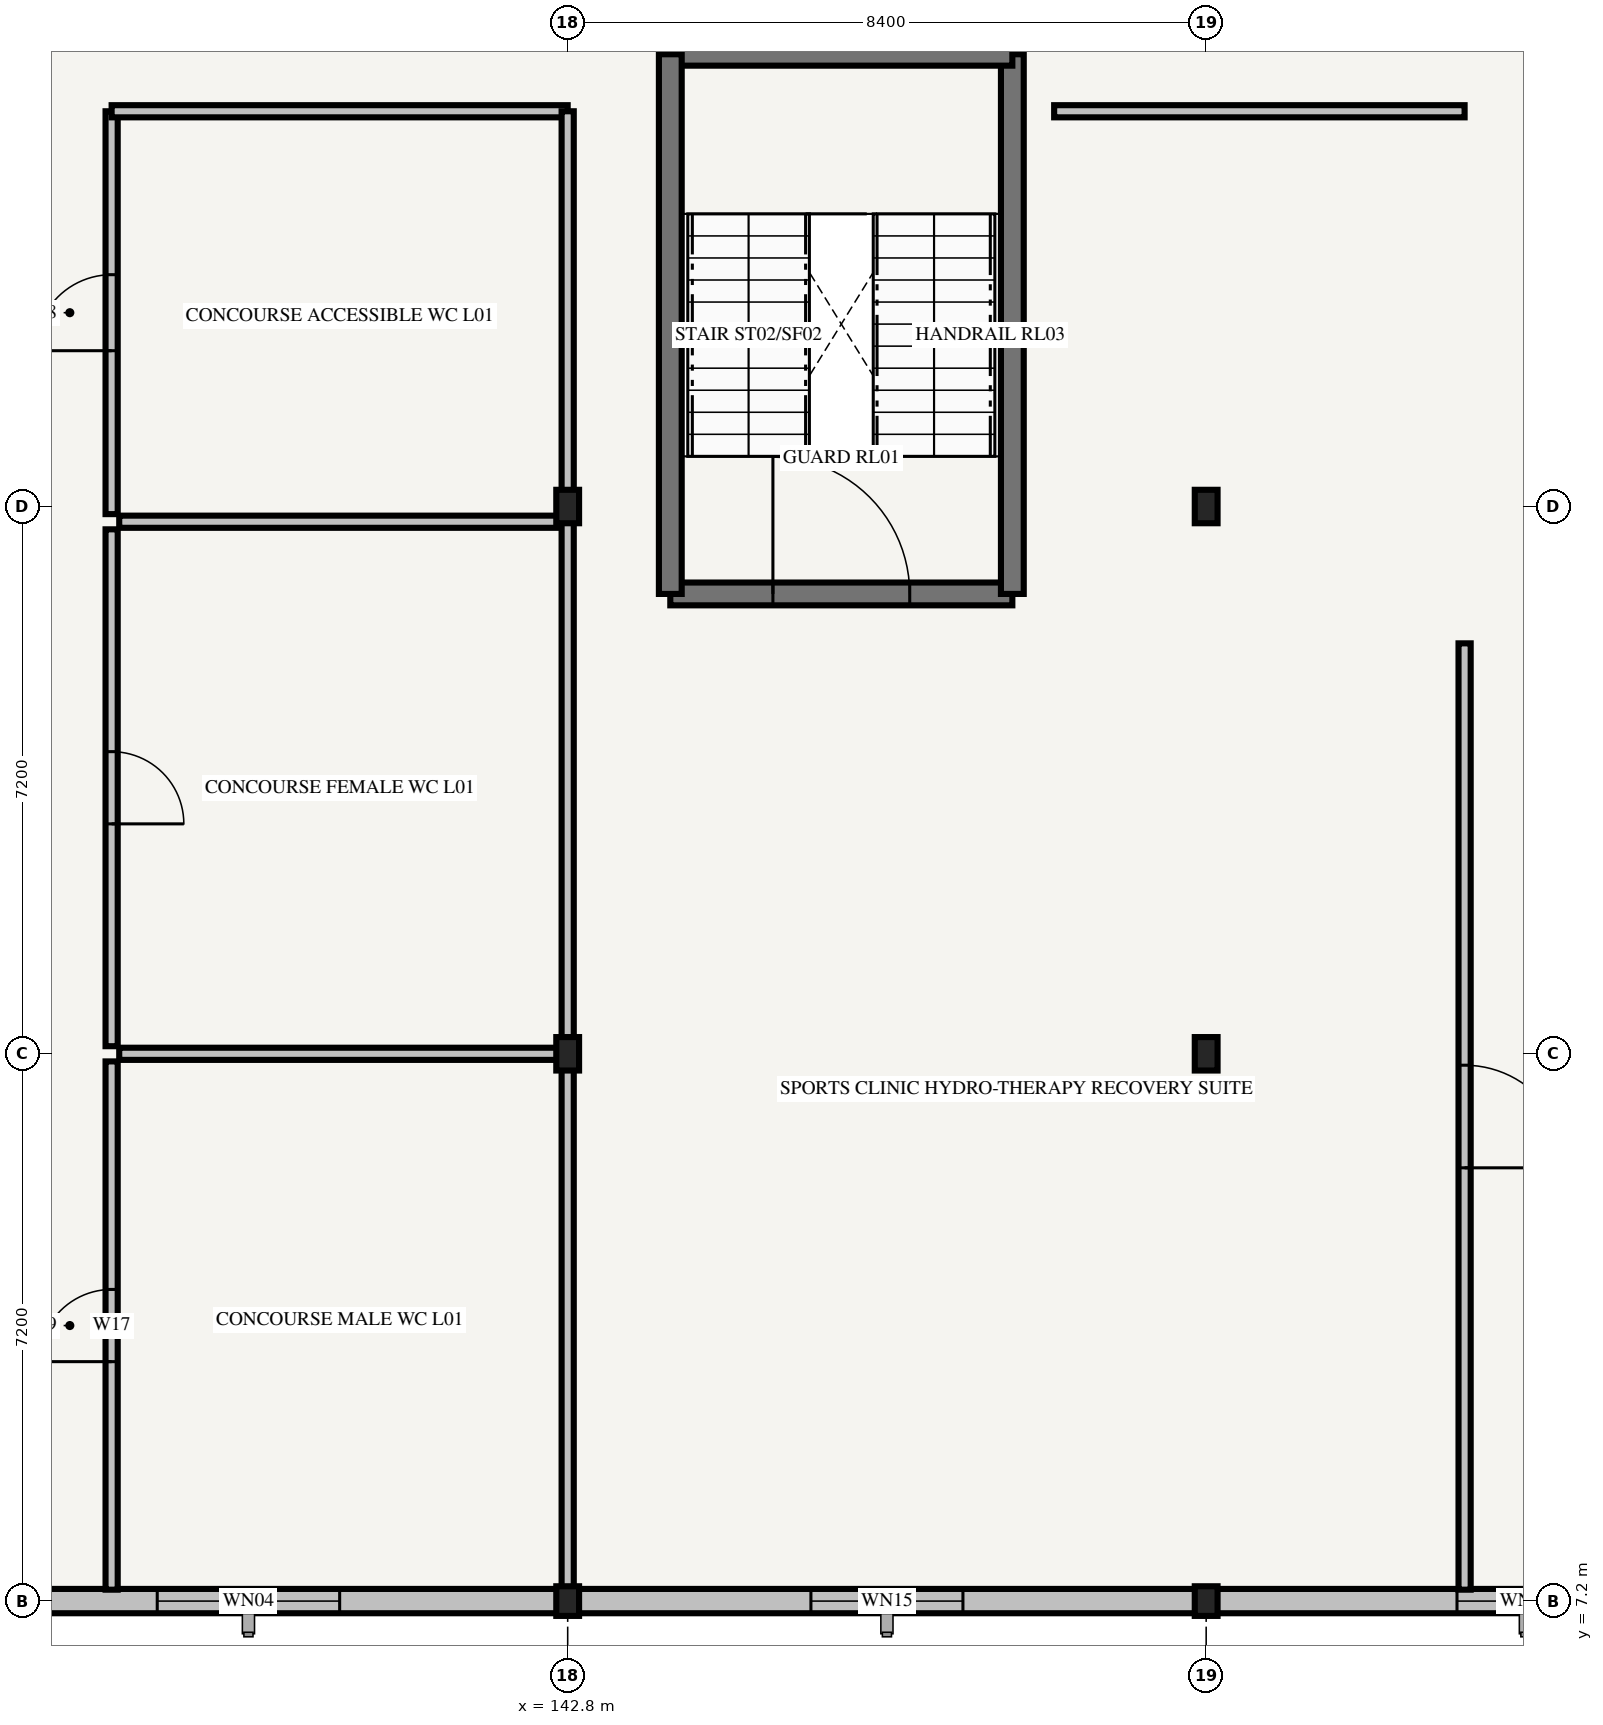
"""IFC4 building model, lengths in metres.
Left out: names, types, materials, properties, quantities, classifications, styles, units other than length and angle.
Written with IfcOpenShell. Run it as: python <this file> out.ifc"""

import sys

from ifc_helpers import new_model, si_unit, direction, frame, frame_2d, origin, origin_2d, place, context, subcontext, project, spatial, rectangle, i_section, extrude, element, fill, save


model = new_model("IFC4")
c1 = context("Model", 3, precision=1e-05, world=origin(), true_north=direction((0.0, 1.0)))
c2 = subcontext(c1, "Body", "Model", "MODEL_VIEW")
j1 = project(units=[si_unit("LENGTHUNIT", "METRE"), si_unit("PLANEANGLEUNIT", "RADIAN")], contexts=[c1])
p1 = place(None, origin())
s1 = spatial("IfcSite", under=j1, at=p1, CompositionType="ELEMENT")
p2 = place(p1, origin())
s2 = spatial("IfcBuilding", under=s1, at=p2, CompositionType="ELEMENT")
p3 = place(p2, frame((0.0, 0.0, 4.5)))
s3 = spatial("IfcBuildingStorey", under=s2, at=p3, CompositionType="ELEMENT", Elevation=4.5)
p4 = place(p3, frame((142.8, 7.2, 0.0), z_axis=(0.0, 0.0, 1.0), x_axis=(1.0, 0.0, 0.0)))
e1 = element("IfcColumn", 1, at=p4, inside=s3, PredefinedType="COLUMN", context=c2, shape_type="SweptSolid", body=[
    extrude(i_section(OverallWidth=0.3, OverallDepth=0.39, WebThickness=0.011, FlangeThickness=0.019, FilletRadius=0.027, at=origin_2d()), origin(), (0.0, 0.0, 1.0), 4.2),
])
for number, where, z_axis, x_axis in (
    (2, (142.8, 14.4, 0.0), (0.0, 0.0, 1.0), (1.0, 0.0, 0.0)),
    (3, (142.8, 21.6, 0.0), (0.0, 0.0, 1.0), (1.0, 0.0, 0.0)),
):
    element("IfcColumn", number, at=place(p3, frame(where, z_axis=z_axis, x_axis=x_axis)), inside=s3, PredefinedType="COLUMN", context=c2, shape_type="SweptSolid", body=[
        extrude(i_section(OverallWidth=0.3, OverallDepth=0.44, WebThickness=0.011, FlangeThickness=0.021, FilletRadius=0.027, at=origin_2d()), origin(), (0.0, 0.0, 1.0), 4.2),
    ])
p5 = place(p3, frame((151.2, 7.2, 0.0), z_axis=(0.0, 0.0, 1.0), x_axis=(1.0, 0.0, 0.0)))
e4 = element("IfcColumn", 4, at=p5, inside=s3, PredefinedType="COLUMN", context=c2, shape_type="SweptSolid", body=[
    extrude(i_section(OverallWidth=0.3, OverallDepth=0.39, WebThickness=0.011, FlangeThickness=0.019, FilletRadius=0.027, at=origin_2d()), origin(), (0.0, 0.0, 1.0), 4.2),
])
for number, where, z_axis, x_axis in (
    (5, (151.2, 14.4, 0.0), (0.0, 0.0, 1.0), (1.0, 0.0, 0.0)),
    (6, (151.2, 21.6, 0.0), (0.0, 0.0, 1.0), (1.0, 0.0, 0.0)),
):
    element("IfcColumn", number, at=place(p3, frame(where, z_axis=z_axis, x_axis=x_axis)), inside=s3, PredefinedType="COLUMN", context=c2, shape_type="SweptSolid", body=[
        extrude(i_section(OverallWidth=0.3, OverallDepth=0.44, WebThickness=0.011, FlangeThickness=0.021, FilletRadius=0.027, at=origin_2d()), origin(), (0.0, 0.0, 1.0), 4.2),
    ])
p6 = place(p3, frame((134.4, 7.2, 0.0), z_axis=(0.0, 0.0, 1.0), x_axis=(1.0, 0.0, 0.0)))
e7 = element("IfcWall", 7, at=p6, inside=s3, PredefinedType="STANDARD", context=c2, shape_type="SweptSolid", body=[
    extrude(rectangle(XDim=8.4, YDim=0.32, at=frame_2d((4.2, 0.0))), origin(), (0.0, 0.0, 1.0), 3.535),
])
p7 = place(p6, frame((3.0, 0.0, 0.85)))
e8 = element("IfcOpeningElement", 8, at=p7, cuts=e7, PredefinedType="OPENING", context=c2, shape_type="SweptSolid", body=[
    extrude(rectangle(XDim=2.4, YDim=1.8, at=frame_2d((1.2, 0.9))), frame((0.0, 0.185, 0.0), z_axis=(0.0, -1.0, 0.0), x_axis=(1.0, 0.0, 0.0)), (0.0, 0.0, 1.0), 0.37),
])
p8 = place(p3, frame((142.8, 7.2, 0.0), z_axis=(0.0, 0.0, 1.0), x_axis=(1.0, 0.0, 0.0)))
e9 = element("IfcWall", 9, at=p8, inside=s3, PredefinedType="STANDARD", context=c2, shape_type="SweptSolid", body=[
    extrude(rectangle(XDim=8.4, YDim=0.32, at=frame_2d((4.2, 0.0))), origin(), (0.0, 0.0, 1.0), 3.485),
])
p9 = place(p8, frame((3.2, 0.0, 0.85)))
e10 = element("IfcOpeningElement", 10, at=p9, cuts=e9, PredefinedType="OPENING", context=c2, shape_type="SweptSolid", body=[
    extrude(rectangle(XDim=2.0, YDim=1.6, at=frame_2d((1.0, 0.8))), frame((0.0, 0.185, 0.0), z_axis=(0.0, -1.0, 0.0), x_axis=(1.0, 0.0, 0.0)), (0.0, 0.0, 1.0), 0.37),
])
p10 = place(p3, frame((151.2, 7.2, 0.0), z_axis=(0.0, 0.0, 1.0), x_axis=(1.0, 0.0, 0.0)))
e11 = element("IfcWall", 11, at=p10, inside=s3, PredefinedType="STANDARD", context=c2, shape_type="SweptSolid", body=[
    extrude(rectangle(XDim=8.4, YDim=0.32, at=frame_2d((4.2, 0.0))), origin(), (0.0, 0.0, 1.0), 3.485),
])
p11 = place(p10, frame((3.3, 0.0, 0.85)))
e12 = element("IfcOpeningElement", 12, at=p11, cuts=e11, PredefinedType="OPENING", context=c2, shape_type="SweptSolid", body=[
    extrude(rectangle(XDim=1.8, YDim=1.8, at=frame_2d((0.9, 0.9))), frame((0.0, 0.185, 0.0), z_axis=(0.0, -1.0, 0.0), x_axis=(1.0, 0.0, 0.0)), (0.0, 0.0, 1.0), 0.37),
])
p12 = place(p3, frame((144.15, 20.45, 0.0), z_axis=(0.0, 0.0, 1.0), x_axis=(1.0, 0.0, 0.0)))
e13 = element("IfcWall", 13, at=p12, inside=s3, PredefinedType="SHEAR", context=c2, shape_type="SweptSolid", body=[
    extrude(rectangle(XDim=4.5, YDim=0.3, at=frame_2d((2.25, 0.0))), origin(), (0.0, 0.0, 1.0), 4.0),
])
p13 = place(p12, frame((1.35, 0.0, 0.0)))
e14 = element("IfcOpeningElement", 14, at=p13, cuts=e13, PredefinedType="OPENING", context=c2, shape_type="SweptSolid", body=[
    extrude(rectangle(XDim=1.8, YDim=2.2, at=frame_2d((0.9, 1.1))), frame((0.0, 0.175, 0.0), z_axis=(0.0, -1.0, 0.0), x_axis=(1.0, 0.0, 0.0)), (0.0, 0.0, 1.0), 0.35),
])
p14 = place(p3, frame((148.65, 20.45, 0.0), z_axis=(0.0, 0.0, 1.0), x_axis=(0.0, 1.0, 0.0)))
e15 = element("IfcWall", 15, at=p14, inside=s3, PredefinedType="SHEAR", context=c2, shape_type="SweptSolid", body=[
    extrude(rectangle(XDim=7.1, YDim=0.3, at=frame_2d((3.55, 0.0))), origin(), (0.0, 0.0, 1.0), 4.0),
])
p15 = place(p3, frame((148.65, 27.55, 0.0), z_axis=(0.0, 0.0, 1.0), x_axis=(-1.0, 0.0, 0.0)))
e16 = element("IfcWall", 16, at=p15, inside=s3, PredefinedType="SHEAR", context=c2, shape_type="SweptSolid", body=[
    extrude(rectangle(XDim=4.5, YDim=0.3, at=frame_2d((2.25, 0.0))), origin(), (0.0, 0.0, 1.0), 4.0),
])
p16 = place(p3, frame((144.15, 27.55, 0.0), z_axis=(0.0, 0.0, 1.0), x_axis=(0.0, -1.0, 0.0)))
e17 = element("IfcWall", 17, at=p16, inside=s3, PredefinedType="SHEAR", context=c2, shape_type="SweptSolid", body=[
    extrude(rectangle(XDim=7.1, YDim=0.3, at=frame_2d((3.55, 0.0))), origin(), (0.0, 0.0, 1.0), 4.0),
])
p17 = place(p3, frame((136.8, 7.35, 0.0), z_axis=(0.0, 0.0, 1.0), x_axis=(0.0, 1.0, 0.0)))
e18 = element("IfcWall", 18, at=p17, inside=s3, PredefinedType="PARTITIONING", context=c2, shape_type="SweptSolid", body=[
    extrude(rectangle(XDim=6.95, YDim=0.16, at=frame_2d((3.475, 0.0))), origin(), (0.0, 0.0, 1.0), 3.32),
])
p18 = place(p17, frame((3.0, 0.0, 0.0)))
e19 = element("IfcOpeningElement", 19, at=p18, cuts=e18, PredefinedType="OPENING", context=c2, shape_type="SweptSolid", body=[
    extrude(rectangle(XDim=0.95, YDim=2.15, at=frame_2d((0.475, 1.075))), frame((0.0, 0.105, 0.0), z_axis=(0.0, -1.0, 0.0), x_axis=(1.0, 0.0, 0.0)), (0.0, 0.0, 1.0), 0.21),
])
p19 = place(p3, frame((136.8, 14.5, 0.0), z_axis=(0.0, 0.0, 1.0), x_axis=(0.0, 1.0, 0.0)))
e20 = element("IfcWall", 20, at=p19, inside=s3, PredefinedType="PARTITIONING", context=c2, shape_type="SweptSolid", body=[
    extrude(rectangle(XDim=6.8, YDim=0.16, at=frame_2d((3.4, 0.0))), origin(), (0.0, 0.0, 1.0), 3.32),
])
p20 = place(p19, frame((2.925, 0.0, 0.0)))
e21 = element("IfcOpeningElement", 21, at=p20, cuts=e20, PredefinedType="OPENING", context=c2, shape_type="SweptSolid", body=[
    extrude(rectangle(XDim=0.95, YDim=2.15, at=frame_2d((0.475, 1.075))), frame((0.0, 0.105, 0.0), z_axis=(0.0, -1.0, 0.0), x_axis=(1.0, 0.0, 0.0)), (0.0, 0.0, 1.0), 0.21),
])
p21 = place(p3, frame((136.8, 21.5, 0.0), z_axis=(0.0, 0.0, 1.0), x_axis=(0.0, 1.0, 0.0)))
e22 = element("IfcWall", 22, at=p21, inside=s3, PredefinedType="PARTITIONING", context=c2, shape_type="SweptSolid", body=[
    extrude(rectangle(XDim=5.3, YDim=0.16, at=frame_2d((2.65, 0.0))), origin(), (0.0, 0.0, 1.0), 3.32),
])
p22 = place(p21, frame((2.15, 0.0, 0.0)))
e23 = element("IfcOpeningElement", 23, at=p22, cuts=e22, PredefinedType="OPENING", context=c2, shape_type="SweptSolid", body=[
    extrude(rectangle(XDim=1.0, YDim=2.15, at=frame_2d((0.5, 1.075))), frame((0.0, 0.105, 0.0), z_axis=(0.0, -1.0, 0.0), x_axis=(1.0, 0.0, 0.0)), (0.0, 0.0, 1.0), 0.21),
])
for number, where, z_axis, x_axis in (
    (24, (136.9, 14.4, 0.0), (0.0, 0.0, 1.0), (1.0, 0.0, 0.0)),
    (25, (136.9, 21.4, 0.0), (0.0, 0.0, 1.0), (1.0, 0.0, 0.0)),
):
    element("IfcWall", number, at=place(p3, frame(where, z_axis=z_axis, x_axis=x_axis)), inside=s3, PredefinedType="PARTITIONING", context=c2, shape_type="SweptSolid", body=[
        extrude(rectangle(XDim=5.9, YDim=0.16, at=frame_2d((2.95, 0.0))), origin(), (0.0, 0.0, 1.0), 3.32),
    ])
p23 = place(p3, frame((136.8, 26.8, 0.0), z_axis=(0.0, 0.0, 1.0), x_axis=(1.0, 0.0, 0.0)))
e26 = element("IfcWall", 26, at=p23, inside=s3, PredefinedType="PARTITIONING", context=c2, shape_type="SweptSolid", body=[
    extrude(rectangle(XDim=6.0, YDim=0.16, at=frame_2d((3.0, 0.0))), origin(), (0.0, 0.0, 1.0), 3.32),
])
p24 = place(p3, frame((142.8, 7.35, 0.0), z_axis=(0.0, 0.0, 1.0), x_axis=(0.0, 1.0, 0.0)))
e27 = element("IfcWall", 27, at=p24, inside=s3, PredefinedType="PARTITIONING", context=c2, shape_type="SweptSolid", body=[
    extrude(rectangle(XDim=19.45, YDim=0.16, at=frame_2d((9.725, 0.0))), origin(), (0.0, 0.0, 1.0), 3.32),
])
p25 = place(p3, frame((154.6, 7.35, 0.0), z_axis=(0.0, 0.0, 1.0), x_axis=(0.0, 1.0, 0.0)))
e28 = element("IfcWall", 28, at=p25, inside=s3, PredefinedType="PARTITIONING", context=c2, shape_type="SweptSolid", body=[
    extrude(rectangle(XDim=12.45, YDim=0.16, at=frame_2d((6.225, 0.0))), origin(), (0.0, 0.0, 1.0), 3.32),
])
p26 = place(p25, frame((5.55, 0.0, 0.0)))
e29 = element("IfcOpeningElement", 29, at=p26, cuts=e28, PredefinedType="OPENING", context=c2, shape_type="SweptSolid", body=[
    extrude(rectangle(XDim=1.35, YDim=2.2, at=frame_2d((0.675, 1.1))), frame((0.0, 0.105, 0.0), z_axis=(0.0, -1.0, 0.0), x_axis=(1.0, 0.0, 0.0)), (0.0, 0.0, 1.0), 0.21),
])
p27 = place(p3, frame((149.2, 26.8, 0.0), z_axis=(0.0, 0.0, 1.0), x_axis=(1.0, 0.0, 0.0)))
e30 = element("IfcWall", 30, at=p27, inside=s3, PredefinedType="PARTITIONING", context=c2, shape_type="SweptSolid", body=[
    extrude(rectangle(XDim=5.4, YDim=0.16, at=frame_2d((2.7, 0.0))), origin(), (0.0, 0.0, 1.0), 3.32),
])
p28 = place(p7, origin())
e31 = element("IfcWindow", 31, at=p28, inside=s3, PartitioningType="SINGLE_PANEL", PredefinedType="WINDOW", context=c2, shape_type="SweptSolid", body=[
    extrude(rectangle(XDim=2.4, YDim=1.8, at=frame_2d((1.2, 0.9))), frame((0.0, 0.03, 0.0), z_axis=(0.0, -1.0, 0.0), x_axis=(1.0, 0.0, 0.0)), (0.0, 0.0, 1.0), 0.06),
])
fill(e8, e31)
p29 = place(p9, origin())
e32 = element("IfcWindow", 32, at=p29, inside=s3, PartitioningType="SINGLE_PANEL", PredefinedType="WINDOW", context=c2, shape_type="SweptSolid", body=[
    extrude(rectangle(XDim=2.0, YDim=1.6, at=frame_2d((1.0, 0.8))), frame((0.0, 0.03, 0.0), z_axis=(0.0, -1.0, 0.0), x_axis=(1.0, 0.0, 0.0)), (0.0, 0.0, 1.0), 0.06),
])
fill(e10, e32)
p30 = place(p11, origin())
e33 = element("IfcWindow", 33, at=p30, inside=s3, PartitioningType="SINGLE_PANEL", PredefinedType="WINDOW", context=c2, shape_type="SweptSolid", body=[
    extrude(rectangle(XDim=1.8, YDim=1.8, at=frame_2d((0.9, 0.9))), frame((0.0, 0.03, 0.0), z_axis=(0.0, -1.0, 0.0), x_axis=(1.0, 0.0, 0.0)), (0.0, 0.0, 1.0), 0.06),
])
fill(e12, e33)
p31 = place(p13, frame((1.8, 0.0, 0.0), z_axis=(0.0, 0.0, 1.0), x_axis=(-1.0, 0.0, 0.0)))
e34 = element("IfcDoor", 34, at=p31, inside=s3, OperationType="DOUBLE_DOOR_SINGLE_SWING", PredefinedType="DOOR", context=c2, shape_type="SweptSolid", body=[
    extrude(rectangle(XDim=1.8, YDim=2.2, at=frame_2d((0.9, 1.1))), frame((0.0, 0.025, 0.0), z_axis=(0.0, -1.0, 0.0), x_axis=(1.0, 0.0, 0.0)), (0.0, 0.0, 1.0), 0.05),
])
fill(e14, e34)
p32 = place(p18, frame((0.95, 0.0, 0.0), z_axis=(0.0, 0.0, 1.0), x_axis=(-1.0, 0.0, 0.0)))
e35 = element("IfcDoor", 35, at=p32, inside=s3, OperationType="SINGLE_SWING_LEFT", PredefinedType="DOOR", context=c2, shape_type="SweptSolid", body=[
    extrude(rectangle(XDim=0.95, YDim=2.15, at=frame_2d((0.475, 1.075))), frame((0.0, 0.025, 0.0), z_axis=(0.0, -1.0, 0.0), x_axis=(1.0, 0.0, 0.0)), (0.0, 0.0, 1.0), 0.05),
])
fill(e19, e35)
p33 = place(p20, origin())
e36 = element("IfcDoor", 36, at=p33, inside=s3, OperationType="SINGLE_SWING_RIGHT", PredefinedType="DOOR", context=c2, shape_type="SweptSolid", body=[
    extrude(rectangle(XDim=0.95, YDim=2.15, at=frame_2d((0.475, 1.075))), frame((0.0, 0.025, 0.0), z_axis=(0.0, -1.0, 0.0), x_axis=(1.0, 0.0, 0.0)), (0.0, 0.0, 1.0), 0.05),
])
fill(e21, e36)
p34 = place(p22, origin())
e37 = element("IfcDoor", 37, at=p34, inside=s3, OperationType="SINGLE_SWING_LEFT", PredefinedType="DOOR", context=c2, shape_type="SweptSolid", body=[
    extrude(rectangle(XDim=1.0, YDim=2.15, at=frame_2d((0.5, 1.075))), frame((0.0, 0.025, 0.0), z_axis=(0.0, -1.0, 0.0), x_axis=(1.0, 0.0, 0.0)), (0.0, 0.0, 1.0), 0.05),
])
fill(e23, e37)
p35 = place(p26, frame((1.35, 0.0, 0.0), z_axis=(0.0, 0.0, 1.0), x_axis=(-1.0, 0.0, 0.0)))
e38 = element("IfcDoor", 38, at=p35, inside=s3, OperationType="SINGLE_SWING_RIGHT", PredefinedType="DOOR", context=c2, shape_type="SweptSolid", body=[
    extrude(rectangle(XDim=1.35, YDim=2.2, at=frame_2d((0.675, 1.1))), frame((0.0, 0.025, 0.0), z_axis=(0.0, -1.0, 0.0), x_axis=(1.0, 0.0, 0.0)), (0.0, 0.0, 1.0), 0.05),
])
fill(e29, e38)
save(model, sys.argv[1])
